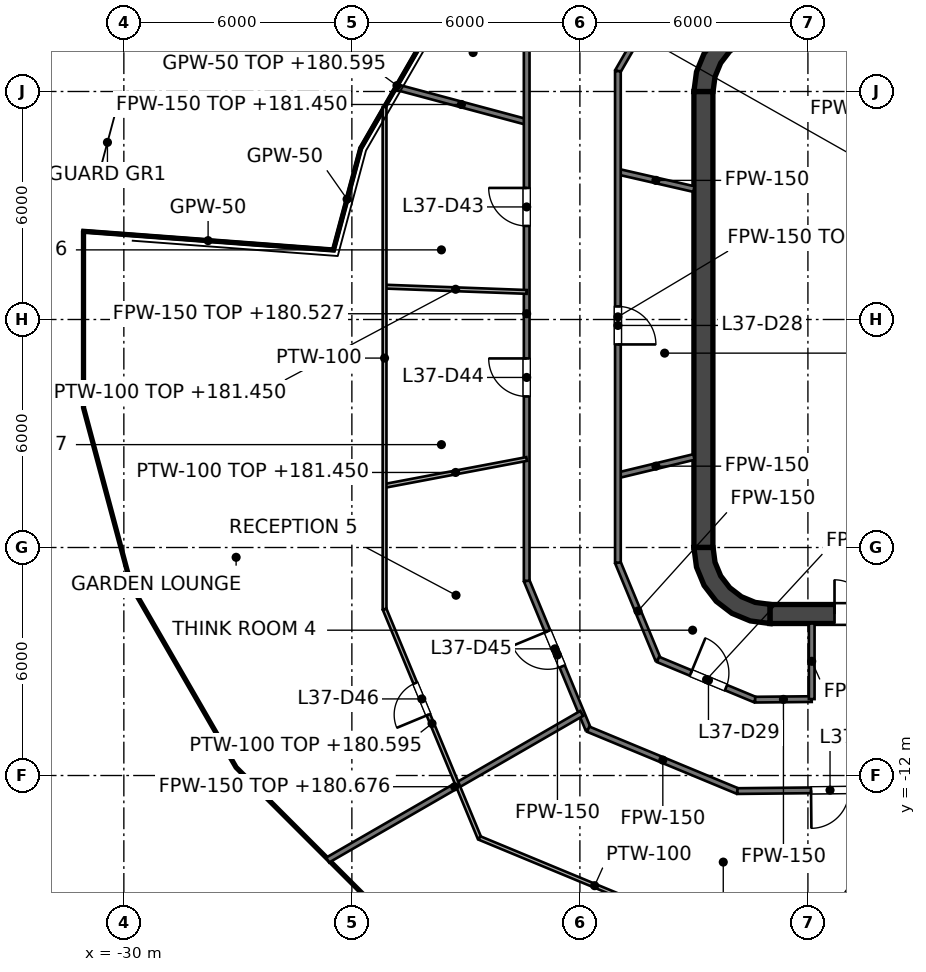
"""IFC4 building model, lengths in metres.
Left out: names, types, materials, properties, quantities, classifications, styles, units other than length and angle.
Written with IfcOpenShell. Run it as: python <this file> out.ifc"""

import sys

from ifc_helpers import new_model, si_unit, direction, frame, frame_2d, origin, place, context, subcontext, project, spatial, polyline, rectangle, outline, extrude, element, fill, save


model = new_model("IFC4")
c1 = context("Model", 3, precision=1e-05, world=origin(), true_north=direction((0.0, 1.0)))
c2 = subcontext(c1, "Body", "Model", "MODEL_VIEW")
j1 = project(units=[si_unit("LENGTHUNIT", "METRE"), si_unit("PLANEANGLEUNIT", "RADIAN")], contexts=[c1])
p1 = place(None, origin())
s1 = spatial("IfcSite", under=j1, at=p1, CompositionType="ELEMENT")
p2 = place(p1, origin())
s2 = spatial("IfcBuilding", under=s1, at=p2, CompositionType="ELEMENT")
p3 = place(p2, frame((0.0, 0.0, 177.6)))
s3 = spatial("IfcBuildingStorey", under=s2, at=p3, CompositionType="ELEMENT", Elevation=177.6)
p4 = place(p3, frame((-13.0, -7.75, 0.0), z_axis=(0.0, 0.0, 1.0), x_axis=(1.0, 0.0, 0.0)))
e1 = element("IfcWall", 1, at=p4, inside=s3, PredefinedType="SHEAR", context=c2, shape_type="SweptSolid", body=[
    extrude(rectangle(XDim=26.0, YDim=0.5, at=frame_2d((13.0, 0.0))), origin(), (0.0, 0.0, 1.0), 4.0),
])
p5 = place(p4, frame((1.7, 0.0, 0.0)))
e2 = element("IfcOpeningElement", 2, at=p5, cuts=e1, PredefinedType="OPENING", context=c2, shape_type="SweptSolid", body=[
    extrude(rectangle(XDim=1.8, YDim=2.1, at=frame_2d((0.9, 1.05))), frame((0.0, 0.25, 0.0), z_axis=(0.0, -1.0, 0.0), x_axis=(1.0, 0.0, 0.0)), (0.0, 0.0, 1.0), 0.5),
])
p6 = place(p4, frame((22.5, 0.0, 0.0)))
e3 = element("IfcOpeningElement", 3, at=p6, cuts=e1, PredefinedType="OPENING", context=c2, shape_type="SweptSolid", body=[
    extrude(rectangle(XDim=1.8, YDim=2.1, at=frame_2d((0.9, 1.05))), frame((0.0, 0.25, 0.0), z_axis=(0.0, -1.0, 0.0), x_axis=(1.0, 0.0, 0.0)), (0.0, 0.0, 1.0), 0.5),
])
p7 = place(p3, frame((-14.75, -6.0, 0.0), z_axis=(0.0, 0.0, 1.0), x_axis=(0.0, 1.0, 0.0)))
e4 = element("IfcWall", 4, at=p7, inside=s3, PredefinedType="SHEAR", context=c2, shape_type="SweptSolid", body=[
    extrude(rectangle(XDim=12.0, YDim=0.5, at=frame_2d((6.0, 0.0))), origin(), (0.0, 0.0, 1.0), 4.0),
])
p8 = place(p3, origin())
e5 = element("IfcWall", 5, at=p8, inside=s3, PredefinedType="SHEAR", context=c2, shape_type="SweptSolid", body=[
    extrude(outline(polyline([(-15.0, 6.0), (-14.496, 6.0), (-14.445, 6.387), (-14.295, 6.748), (-14.058, 7.058), (-13.748, 7.295), (-13.387, 7.445), (-13.0, 7.496), (-13.0, 8.0), (-13.518, 7.932), (-14.0, 7.732), (-14.414, 7.414), (-14.732, 7.0), (-14.932, 6.518), (-15.0, 6.0)])), origin(), (0.0, 0.0, 1.0), 4.0),
])
e6 = element("IfcWall", 6, at=p8, inside=s3, PredefinedType="SHEAR", context=c2, shape_type="SweptSolid", body=[
    extrude(outline(polyline([(-13.0, -8.0), (-13.0, -7.496), (-13.387, -7.445), (-13.748, -7.295), (-14.058, -7.058), (-14.295, -6.748), (-14.445, -6.387), (-14.496, -6.0), (-15.0, -6.0), (-14.932, -6.518), (-14.732, -7.0), (-14.414, -7.414), (-14.0, -7.732), (-13.518, -7.932), (-13.0, -8.0)])), origin(), (0.0, 0.0, 1.0), 4.0),
])
p9 = place(p3, frame((-11.8, -7.5, 0.0), z_axis=(0.0, 0.0, 1.0), x_axis=(0.0, 1.0, 0.0)))
e7 = element("IfcWall", 7, at=p9, inside=s3, PredefinedType="SOLIDWALL", context=c2, shape_type="SweptSolid", body=[
    extrude(rectangle(XDim=15.0, YDim=0.4, at=frame_2d((7.5, 0.0))), origin(), (0.0, 0.0, 1.0), 3.85),
])
p10 = place(p9, frame((11.3, 0.0, 0.0)))
e8 = element("IfcOpeningElement", 8, at=p10, cuts=e7, PredefinedType="OPENING", context=c2, shape_type="SweptSolid", body=[
    extrude(rectangle(XDim=1.1, YDim=2.1, at=frame_2d((0.55, 1.05))), frame((0.0, 0.2, 0.0), z_axis=(0.0, -1.0, 0.0), x_axis=(1.0, 0.0, 0.0)), (0.0, 0.0, 1.0), 0.4),
])
p11 = place(p9, frame((8.4, 0.0, 0.0)))
e9 = element("IfcOpeningElement", 9, at=p11, cuts=e7, PredefinedType="OPENING", context=c2, shape_type="SweptSolid", body=[
    extrude(rectangle(XDim=1.1, YDim=2.1, at=frame_2d((0.55, 1.05))), frame((0.0, 0.2, 0.0), z_axis=(0.0, -1.0, 0.0), x_axis=(1.0, 0.0, 0.0)), (0.0, 0.0, 1.0), 0.4),
])
p12 = place(p9, frame((5.5, 0.0, 0.0)))
e10 = element("IfcOpeningElement", 10, at=p12, cuts=e7, PredefinedType="OPENING", context=c2, shape_type="SweptSolid", body=[
    extrude(rectangle(XDim=1.1, YDim=2.1, at=frame_2d((0.55, 1.05))), frame((0.0, 0.2, 0.0), z_axis=(0.0, -1.0, 0.0), x_axis=(1.0, 0.0, 0.0)), (0.0, 0.0, 1.0), 0.4),
])
p13 = place(p9, frame((13.697, 0.0, 0.0)))
e11 = element("IfcOpeningElement", 11, at=p13, cuts=e7, PredefinedType="OPENING", context=c2, shape_type="SweptSolid", body=[
    extrude(rectangle(XDim=0.9, YDim=2.1, at=frame_2d((0.45, 1.05))), frame((0.0, 0.2, 0.0), z_axis=(0.0, -1.0, 0.0), x_axis=(1.0, 0.0, 0.0)), (0.0, 0.0, 1.0), 0.4),
])
p14 = place(p9, frame((0.403, 0.0, 0.0)))
e12 = element("IfcOpeningElement", 12, at=p14, cuts=e7, PredefinedType="OPENING", context=c2, shape_type="SweptSolid", body=[
    extrude(rectangle(XDim=0.9, YDim=2.1, at=frame_2d((0.45, 1.05))), frame((0.0, 0.2, 0.0), z_axis=(0.0, -1.0, 0.0), x_axis=(1.0, 0.0, 0.0)), (0.0, 0.0, 1.0), 0.4),
])
e13 = element("IfcWall", 13, at=p8, inside=s3, PredefinedType="SOLIDWALL", context=c2, shape_type="SweptSolid", body=[
    extrude(outline(polyline([(-12.0, -5.925), (-12.0, -5.675), (-14.25, -5.675), (-14.25, -3.025), (-12.0, -3.025), (-12.0, -2.775), (-14.25, -2.775), (-14.25, -0.125), (-12.0, -0.125), (-12.0, 0.125), (-14.25, 0.125), (-14.25, 2.775), (-12.0, 2.775), (-12.0, 3.025), (-14.25, 3.025), (-14.25, 5.675), (-12.0, 5.675), (-12.0, 5.925), (-14.25, 5.925), (-14.5, 5.925), (-14.5, 5.675), (-14.5, 3.025), (-14.5, 2.775), (-14.5, 0.125), (-14.5, -0.125), (-14.5, -2.775), (-14.5, -3.025), (-14.5, -5.675), (-14.5, -5.925), (-14.25, -5.925), (-12.0, -5.925)])), origin(), (0.0, 0.0, 1.0), 3.85),
])
p15 = place(p3, frame((-19.4, -6.876, 0.0), z_axis=(0.0, 0.0, 1.0), x_axis=(0.382843135608, -0.92381336509, 0.0)))
e14 = element("IfcWall", 14, at=p15, inside=s3, PredefinedType="PARTITIONING", context=c2, shape_type="SweptSolid", body=[
    extrude(rectangle(XDim=4.227, YDim=0.15, at=frame_2d((2.114, 0.0))), origin(), (0.0, 0.0, 1.0), 2.995),
])
p16 = place(p15, frame((1.438, 0.0, 0.0)))
e15 = element("IfcOpeningElement", 15, at=p16, cuts=e14, PredefinedType="OPENING", context=c2, shape_type="SweptSolid", body=[
    extrude(rectangle(XDim=1.0, YDim=2.1, at=frame_2d((0.5, 1.05))), frame((0.0, 0.075, 0.0), z_axis=(0.0, -1.0, 0.0), x_axis=(1.0, 0.0, 0.0)), (0.0, 0.0, 1.0), 0.15),
])
p17 = place(p3, frame((-17.0, -6.398, 0.0), z_axis=(0.0, 0.0, 1.0), x_axis=(0.382828866893, -0.923819278146, 0.0)))
e16 = element("IfcWall", 16, at=p17, inside=s3, PredefinedType="PARTITIONING", context=c2, shape_type="SweptSolid", body=[
    extrude(rectangle(XDim=2.757, YDim=0.15, at=frame_2d((1.378, 0.0))), origin(), (0.0, 0.0, 1.0), 2.995),
])
p18 = place(p3, frame((-17.781, -10.781, 0.0), z_axis=(0.0, 0.0, 1.0), x_axis=(0.923814466195, -0.382840478592, 0.0)))
e17 = element("IfcWall", 17, at=p18, inside=s3, PredefinedType="PARTITIONING", context=c2, shape_type="SweptSolid", body=[
    extrude(rectangle(XDim=4.25, YDim=0.15, at=frame_2d((2.125, 0.0))), origin(), (0.0, 0.0, 1.0), 2.995),
])
p19 = place(p3, frame((-15.945, -8.945, 0.0), z_axis=(0.0, 0.0, 1.0), x_axis=(0.923818976108, -0.382829595752, 0.0)))
e18 = element("IfcWall", 18, at=p19, inside=s3, PredefinedType="PARTITIONING", context=c2, shape_type="SweptSolid", body=[
    extrude(rectangle(XDim=2.768, YDim=0.15, at=frame_2d((1.384, 0.0))), origin(), (0.0, 0.0, 1.0), 2.995),
])
p20 = place(p19, frame((0.938, 0.0, 0.0)))
e19 = element("IfcOpeningElement", 19, at=p20, cuts=e18, PredefinedType="OPENING", context=c2, shape_type="SweptSolid", body=[
    extrude(rectangle(XDim=1.0, YDim=2.1, at=frame_2d((0.5, 1.05))), frame((0.0, 0.075, 0.0), z_axis=(0.0, -1.0, 0.0), x_axis=(1.0, 0.0, 0.0)), (0.0, 0.0, 1.0), 0.15),
])
p21 = place(p3, frame((-22.835, 6.118, 0.0), z_axis=(0.0, 0.0, 1.0), x_axis=(0.965960919092, -0.258688041446, 0.0)))
e20 = element("IfcWall", 20, at=p21, inside=s3, PredefinedType="PARTITIONING", context=c2, shape_type="SweptSolid", body=[
    extrude(rectangle(XDim=3.556, YDim=0.15, at=frame_2d((1.778, 0.0))), origin(), (0.0, 0.0, 1.0), 3.85),
])
p22 = place(p3, frame((-17.0, 3.89, 0.0), z_axis=(0.0, 0.0, 1.0), x_axis=(0.974792736312, -0.223112351146, 0.0)))
e21 = element("IfcWall", 21, at=p22, inside=s3, PredefinedType="PARTITIONING", context=c2, shape_type="SweptSolid", body=[
    extrude(rectangle(XDim=2.052, YDim=0.15, at=frame_2d((1.026, 0.0))), origin(), (0.0, 0.0, 1.0), 2.995),
])
p23 = place(p3, frame((-13.855, -12.409, 0.0), z_axis=(0.0, 0.0, 1.0), x_axis=(0.999951009258, 0.009898438446, 0.0)))
e22 = element("IfcWall", 22, at=p23, inside=s3, PredefinedType="PARTITIONING", context=c2, shape_type="SweptSolid", body=[
    extrude(rectangle(XDim=30.411, YDim=0.15, at=frame_2d((15.206, 0.0))), origin(), (0.0, 0.0, 1.0), 2.927),
])
p24 = place(p23, frame((16.877, 0.0, 0.0)))
e23 = element("IfcOpeningElement", 23, at=p24, cuts=e22, PredefinedType="OPENING", context=c2, shape_type="SweptSolid", body=[
    extrude(rectangle(XDim=1.0, YDim=2.1, at=frame_2d((0.5, 1.05))), frame((0.0, 0.075, 0.0), z_axis=(0.0, -1.0, 0.0), x_axis=(1.0, 0.0, 0.0)), (0.0, 0.0, 1.0), 0.15),
])
p25 = place(p23, frame((25.106, 0.0, 0.0)))
e24 = element("IfcOpeningElement", 24, at=p25, cuts=e22, PredefinedType="OPENING", context=c2, shape_type="SweptSolid", body=[
    extrude(rectangle(XDim=1.0, YDim=2.1, at=frame_2d((0.5, 1.05))), frame((0.0, 0.075, 0.0), z_axis=(0.0, -1.0, 0.0), x_axis=(1.0, 0.0, 0.0)), (0.0, 0.0, 1.0), 0.15),
])
p26 = place(p23, frame((1.937, 0.0, 0.0)))
e25 = element("IfcOpeningElement", 25, at=p26, cuts=e22, PredefinedType="OPENING", context=c2, shape_type="SweptSolid", body=[
    extrude(rectangle(XDim=1.0, YDim=2.1, at=frame_2d((0.5, 1.05))), frame((0.0, 0.075, 0.0), z_axis=(0.0, -1.0, 0.0), x_axis=(1.0, 0.0, 0.0)), (0.0, 0.0, 1.0), 0.15),
])
p27 = place(p23, frame((8.915, 0.0, 0.0)))
e26 = element("IfcOpeningElement", 26, at=p27, cuts=e22, PredefinedType="OPENING", context=c2, shape_type="SweptSolid", body=[
    extrude(rectangle(XDim=1.0, YDim=2.1, at=frame_2d((0.5, 1.05))), frame((0.0, 0.075, 0.0), z_axis=(0.0, -1.0, 0.0), x_axis=(1.0, 0.0, 0.0)), (0.0, 0.0, 1.0), 0.15),
])
p28 = place(p3, frame((-13.388, -10.004, 0.0), z_axis=(0.0, 0.0, 1.0), x_axis=(0.999951550029, 0.009843657588, 0.0)))
e27 = element("IfcWall", 27, at=p28, inside=s3, PredefinedType="PARTITIONING", context=c2, shape_type="SweptSolid", body=[
    extrude(rectangle(XDim=1.488, YDim=0.15, at=frame_2d((0.744, 0.0))), origin(), (0.0, 0.0, 1.0), 2.995),
])
p29 = place(p3, frame((-17.0, -4.101, 0.0), z_axis=(0.0, 0.0, 1.0), x_axis=(0.972092474047, 0.234598000634, 0.0)))
e28 = element("IfcWall", 28, at=p29, inside=s3, PredefinedType="PARTITIONING", context=c2, shape_type="SweptSolid", body=[
    extrude(rectangle(XDim=2.057, YDim=0.15, at=frame_2d((1.029, 0.0))), origin(), (0.0, 0.0, 1.0), 2.995),
])
p30 = place(p3, frame((-24.636, -14.224, 0.0), z_axis=(0.0, 0.0, 1.0), x_axis=(0.866036485599, 0.499980805243, 0.0)))
e29 = element("IfcWall", 29, at=p30, inside=s3, PredefinedType="PARTITIONING", context=c2, shape_type="SweptSolid", body=[
    extrude(rectangle(XDim=7.717, YDim=0.15, at=frame_2d((3.858, 0.0))), origin(), (0.0, 0.0, 1.0), 3.076),
])
p31 = place(p3, frame((-17.0, 6.536, 0.0), z_axis=(0.0, 0.0, 1.0), x_axis=(0.499965700209, 0.866045205872, 0.0)))
e30 = element("IfcWall", 30, at=p31, inside=s3, PredefinedType="PARTITIONING", context=c2, shape_type="SweptSolid", body=[
    extrude(rectangle(XDim=3.678, YDim=0.15, at=frame_2d((1.839, 0.0))), origin(), (0.0, 0.0, 1.0), 2.995),
])
p32 = place(p31, frame((1.338, 0.0, 0.0)))
e31 = element("IfcOpeningElement", 31, at=p32, cuts=e30, PredefinedType="OPENING", context=c2, shape_type="SweptSolid", body=[
    extrude(rectangle(XDim=1.0, YDim=2.1, at=frame_2d((0.5, 1.05))), frame((0.0, 0.075, 0.0), z_axis=(0.0, -1.0, 0.0), x_axis=(1.0, 0.0, 0.0)), (0.0, 0.0, 1.0), 0.15),
])
p33 = place(p3, frame((-11.9, -9.989, 0.0), z_axis=(0.0, 0.0, 1.0), x_axis=(0.0, 1.0, 0.0)))
e32 = element("IfcWall", 32, at=p33, inside=s3, PredefinedType="PARTITIONING", context=c2, shape_type="SweptSolid", body=[
    extrude(rectangle(XDim=1.989, YDim=0.15, at=frame_2d((0.995, 0.0))), origin(), (0.0, 0.0, 1.0), 2.995),
])
p34 = place(p3, frame((-17.0, -6.398, 0.0), z_axis=(0.0, 0.0, 1.0), x_axis=(0.0, 1.0, 0.0)))
e33 = element("IfcWall", 33, at=p34, inside=s3, PredefinedType="PARTITIONING", context=c2, shape_type="SweptSolid", body=[
    extrude(rectangle(XDim=12.934, YDim=0.15, at=frame_2d((6.467, 0.0))), origin(), (0.0, 0.0, 1.0), 2.927),
])
p35 = place(p34, frame((5.742, 0.0, 0.0)))
e34 = element("IfcOpeningElement", 34, at=p35, cuts=e33, PredefinedType="OPENING", context=c2, shape_type="SweptSolid", body=[
    extrude(rectangle(XDim=1.0, YDim=2.1, at=frame_2d((0.5, 1.05))), frame((0.0, 0.075, 0.0), z_axis=(0.0, -1.0, 0.0), x_axis=(1.0, 0.0, 0.0)), (0.0, 0.0, 1.0), 0.15),
])
p36 = place(p3, frame((-19.4, -6.876, 0.0), z_axis=(0.0, 0.0, 1.0), x_axis=(0.0, 1.0, 0.0)))
e35 = element("IfcWall", 35, at=p36, inside=s3, PredefinedType="PARTITIONING", context=c2, shape_type="SweptSolid", body=[
    extrude(rectangle(XDim=14.055, YDim=0.15, at=frame_2d((7.027, 0.0))), origin(), (0.0, 0.0, 1.0), 2.927),
])
p37 = place(p36, frame((9.338, 0.0, 0.0)))
e36 = element("IfcOpeningElement", 36, at=p37, cuts=e35, PredefinedType="OPENING", context=c2, shape_type="SweptSolid", body=[
    extrude(rectangle(XDim=1.0, YDim=2.1, at=frame_2d((0.5, 1.05))), frame((0.0, 0.075, 0.0), z_axis=(0.0, -1.0, 0.0), x_axis=(1.0, 0.0, 0.0)), (0.0, 0.0, 1.0), 0.15),
])
p38 = place(p36, frame((4.851, 0.0, 0.0)))
e37 = element("IfcOpeningElement", 37, at=p38, cuts=e35, PredefinedType="OPENING", context=c2, shape_type="SweptSolid", body=[
    extrude(rectangle(XDim=1.0, YDim=2.1, at=frame_2d((0.5, 1.05))), frame((0.0, 0.075, 0.0), z_axis=(0.0, -1.0, 0.0), x_axis=(1.0, 0.0, 0.0)), (0.0, 0.0, 1.0), 0.15),
])
p39 = place(p3, frame((-31.082, 2.322, 0.0), z_axis=(0.0, 0.0, 1.0), x_axis=(0.997221144943, -0.074498242124, 0.0)))
e38 = element("IfcWall", 38, at=p39, inside=s3, PredefinedType="PARTITIONING", context=c2, shape_type="SweptSolid", body=[
    extrude(rectangle(XDim=6.616, YDim=0.05, at=frame_2d((3.308, 0.0))), origin(), (0.0, 0.0, 1.0), 2.927),
])
p40 = place(p3, frame((-23.768, 4.504, 0.0), z_axis=(0.0, 0.0, 1.0), x_axis=(0.500289326849, 0.865858296398, 0.0)))
e39 = element("IfcWall", 39, at=p40, inside=s3, PredefinedType="PARTITIONING", context=c2, shape_type="SweptSolid", body=[
    extrude(rectangle(XDim=3.815, YDim=0.05, at=frame_2d((1.907, 0.0))), origin(), (0.0, 0.0, 1.0), 2.995),
])
p41 = place(p3, frame((-24.484, 1.829, 0.0), z_axis=(0.0, 0.0, 1.0), x_axis=(0.258518653834, 0.966006265828, 0.0)))
e40 = element("IfcWall", 40, at=p41, inside=s3, PredefinedType="PARTITIONING", context=c2, shape_type="SweptSolid", body=[
    extrude(rectangle(XDim=2.769, YDim=0.05, at=frame_2d((1.385, 0.0))), origin(), (0.0, 0.0, 1.0), 2.927),
])
p42 = place(p3, frame((-23.14, -7.621, 0.0), z_axis=(0.0, 0.0, 1.0), x_axis=(0.383080493462, -0.923714964439, 0.0)))
e41 = element("IfcWall", 41, at=p42, inside=s3, PredefinedType="PARTITIONING", context=c2, shape_type="SweptSolid", body=[
    extrude(rectangle(XDim=6.519, YDim=0.1, at=frame_2d((3.26, 0.0))), origin(), (0.0, 0.0, 1.0), 2.995),
])
p43 = place(p42, frame((2.109, 0.0, 0.0)))
e42 = element("IfcOpeningElement", 42, at=p43, cuts=e41, PredefinedType="OPENING", context=c2, shape_type="SweptSolid", body=[
    extrude(rectangle(XDim=0.9, YDim=2.1, at=frame_2d((0.45, 1.05))), frame((0.0, 0.05, 0.0), z_axis=(0.0, -1.0, 0.0), x_axis=(1.0, 0.0, 0.0)), (0.0, 0.0, 1.0), 0.1),
])
p44 = place(p3, frame((-20.643, -13.643, 0.0), z_axis=(0.0, 0.0, 1.0), x_axis=(0.923751425001, -0.382992564953, 0.0)))
e43 = element("IfcWall", 43, at=p44, inside=s3, PredefinedType="PARTITIONING", context=c2, shape_type="SweptSolid", body=[
    extrude(rectangle(XDim=6.561, YDim=0.1, at=frame_2d((3.281, 0.0))), origin(), (0.0, 0.0, 1.0), 2.927),
])
p45 = place(p3, frame((-23.14, 0.865, 0.0), z_axis=(0.0, 0.0, 1.0), x_axis=(0.99931089625, -0.037117821004, 0.0)))
e44 = element("IfcWall", 44, at=p45, inside=s3, PredefinedType="PARTITIONING", context=c2, shape_type="SweptSolid", body=[
    extrude(rectangle(XDim=3.743, YDim=0.1, at=frame_2d((1.871, 0.0))), origin(), (0.0, 0.0, 1.0), 3.85),
])
p46 = place(p3, frame((-23.14, -4.379, 0.0), z_axis=(0.0, 0.0, 1.0), x_axis=(0.982549025403, 0.186003797485, 0.0)))
e45 = element("IfcWall", 45, at=p46, inside=s3, PredefinedType="PARTITIONING", context=c2, shape_type="SweptSolid", body=[
    extrude(rectangle(XDim=3.806, YDim=0.1, at=frame_2d((1.903, 0.0))), origin(), (0.0, 0.0, 1.0), 3.85),
])
p47 = place(p3, frame((-11.717, -16.128, 0.0), z_axis=(0.0, 0.0, 1.0), x_axis=(0.587825586486, 0.808987688332, 0.0)))
e46 = element("IfcWall", 46, at=p47, inside=s3, PredefinedType="PARTITIONING", context=c2, shape_type="SweptSolid", body=[
    extrude(rectangle(XDim=4.656, YDim=0.1, at=frame_2d((2.328, 0.0))), origin(), (0.0, 0.0, 1.0), 2.927),
])
p48 = place(p3, frame((-23.14, -7.621, 0.0), z_axis=(0.0, 0.0, 1.0), x_axis=(0.0, 1.0, 0.0)))
e47 = element("IfcWall", 47, at=p48, inside=s3, PredefinedType="PARTITIONING", context=c2, shape_type="SweptSolid", body=[
    extrude(rectangle(XDim=13.211, YDim=0.1, at=frame_2d((6.605, 0.0))), origin(), (0.0, 0.0, 1.0), 2.927),
])
p49 = place(p10, origin())
e48 = element("IfcDoor", 48, at=p49, inside=s3, OperationType="DOUBLE_DOOR_SLIDING", PredefinedType="DOOR", context=c2, shape_type="SweptSolid", body=[
    extrude(rectangle(XDim=1.1, YDim=2.1, at=frame_2d((0.55, 1.05))), frame((0.0, 0.025, 0.0), z_axis=(0.0, -1.0, 0.0), x_axis=(1.0, 0.0, 0.0)), (0.0, 0.0, 1.0), 0.05),
])
fill(e8, e48)
p50 = place(p11, origin())
e49 = element("IfcDoor", 49, at=p50, inside=s3, OperationType="DOUBLE_DOOR_SLIDING", PredefinedType="DOOR", context=c2, shape_type="SweptSolid", body=[
    extrude(rectangle(XDim=1.1, YDim=2.1, at=frame_2d((0.55, 1.05))), frame((0.0, 0.025, 0.0), z_axis=(0.0, -1.0, 0.0), x_axis=(1.0, 0.0, 0.0)), (0.0, 0.0, 1.0), 0.05),
])
fill(e9, e49)
p51 = place(p12, origin())
e50 = element("IfcDoor", 50, at=p51, inside=s3, OperationType="DOUBLE_DOOR_SLIDING", PredefinedType="DOOR", context=c2, shape_type="SweptSolid", body=[
    extrude(rectangle(XDim=1.1, YDim=2.1, at=frame_2d((0.55, 1.05))), frame((0.0, 0.025, 0.0), z_axis=(0.0, -1.0, 0.0), x_axis=(1.0, 0.0, 0.0)), (0.0, 0.0, 1.0), 0.05),
])
fill(e10, e50)
p52 = place(p13, origin())
e51 = element("IfcDoor", 51, at=p52, inside=s3, OperationType="SINGLE_SWING_LEFT", PredefinedType="DOOR", context=c2, shape_type="SweptSolid", body=[
    extrude(rectangle(XDim=0.9, YDim=2.1, at=frame_2d((0.45, 1.05))), frame((0.0, 0.025, 0.0), z_axis=(0.0, -1.0, 0.0), x_axis=(1.0, 0.0, 0.0)), (0.0, 0.0, 1.0), 0.05),
])
fill(e11, e51)
p53 = place(p14, origin())
e52 = element("IfcDoor", 52, at=p53, inside=s3, OperationType="SINGLE_SWING_LEFT", PredefinedType="DOOR", context=c2, shape_type="SweptSolid", body=[
    extrude(rectangle(XDim=0.9, YDim=2.1, at=frame_2d((0.45, 1.05))), frame((0.0, 0.025, 0.0), z_axis=(0.0, -1.0, 0.0), x_axis=(1.0, 0.0, 0.0)), (0.0, 0.0, 1.0), 0.05),
])
fill(e12, e52)
p54 = place(p5, origin())
e53 = element("IfcDoor", 53, at=p54, inside=s3, OperationType="DOUBLE_DOOR_SINGLE_SWING", PredefinedType="DOOR", context=c2, shape_type="SweptSolid", body=[
    extrude(rectangle(XDim=1.8, YDim=2.1, at=frame_2d((0.9, 1.05))), frame((0.0, 0.025, 0.0), z_axis=(0.0, -1.0, 0.0), x_axis=(1.0, 0.0, 0.0)), (0.0, 0.0, 1.0), 0.05),
])
fill(e2, e53)
p55 = place(p35, origin())
e54 = element("IfcDoor", 54, at=p55, inside=s3, OperationType="SINGLE_SWING_LEFT", PredefinedType="DOOR", context=c2, shape_type="SweptSolid", body=[
    extrude(rectangle(XDim=1.0, YDim=2.1, at=frame_2d((0.5, 1.05))), frame((0.0, 0.025, 0.0), z_axis=(0.0, -1.0, 0.0), x_axis=(1.0, 0.0, 0.0)), (0.0, 0.0, 1.0), 0.05),
])
fill(e34, e54)
p56 = place(p20, origin())
e55 = element("IfcDoor", 55, at=p56, inside=s3, OperationType="SINGLE_SWING_LEFT", PredefinedType="DOOR", context=c2, shape_type="SweptSolid", body=[
    extrude(rectangle(XDim=1.0, YDim=2.1, at=frame_2d((0.5, 1.05))), frame((0.0, 0.025, 0.0), z_axis=(0.0, -1.0, 0.0), x_axis=(1.0, 0.0, 0.0)), (0.0, 0.0, 1.0), 0.05),
])
fill(e19, e55)
p57 = place(p37, origin())
e56 = element("IfcDoor", 56, at=p57, inside=s3, OperationType="SINGLE_SWING_RIGHT", PredefinedType="DOOR", context=c2, shape_type="SweptSolid", body=[
    extrude(rectangle(XDim=1.0, YDim=2.1, at=frame_2d((0.5, 1.05))), frame((0.0, 0.025, 0.0), z_axis=(0.0, -1.0, 0.0), x_axis=(1.0, 0.0, 0.0)), (0.0, 0.0, 1.0), 0.05),
])
fill(e36, e56)
p58 = place(p38, origin())
e57 = element("IfcDoor", 57, at=p58, inside=s3, OperationType="SINGLE_SWING_RIGHT", PredefinedType="DOOR", context=c2, shape_type="SweptSolid", body=[
    extrude(rectangle(XDim=1.0, YDim=2.1, at=frame_2d((0.5, 1.05))), frame((0.0, 0.025, 0.0), z_axis=(0.0, -1.0, 0.0), x_axis=(1.0, 0.0, 0.0)), (0.0, 0.0, 1.0), 0.05),
])
fill(e37, e57)
p59 = place(p16, origin())
e58 = element("IfcDoor", 58, at=p59, inside=s3, OperationType="SINGLE_SWING_LEFT", PredefinedType="DOOR", context=c2, shape_type="SweptSolid", body=[
    extrude(rectangle(XDim=1.0, YDim=2.1, at=frame_2d((0.5, 1.05))), frame((0.0, 0.025, 0.0), z_axis=(0.0, -1.0, 0.0), x_axis=(1.0, 0.0, 0.0)), (0.0, 0.0, 1.0), 0.05),
])
fill(e15, e58)
p60 = place(p43, origin())
e59 = element("IfcDoor", 59, at=p60, inside=s3, OperationType="SINGLE_SWING_RIGHT", PredefinedType="DOOR", context=c2, shape_type="SweptSolid", body=[
    extrude(rectangle(XDim=0.9, YDim=2.1, at=frame_2d((0.45, 1.05))), frame((0.0, 0.025, 0.0), z_axis=(0.0, -1.0, 0.0), x_axis=(1.0, 0.0, 0.0)), (0.0, 0.0, 1.0), 0.05),
])
fill(e42, e59)
p61 = place(p26, origin())
e60 = element("IfcDoor", 60, at=p61, inside=s3, OperationType="SINGLE_SWING_LEFT", PredefinedType="DOOR", context=c2, shape_type="SweptSolid", body=[
    extrude(rectangle(XDim=1.0, YDim=2.1, at=frame_2d((0.5, 1.05))), frame((0.0, 0.025, 0.0), z_axis=(0.0, -1.0, 0.0), x_axis=(1.0, 0.0, 0.0)), (0.0, 0.0, 1.0), 0.05),
])
fill(e25, e60)
save(model, sys.argv[1])
